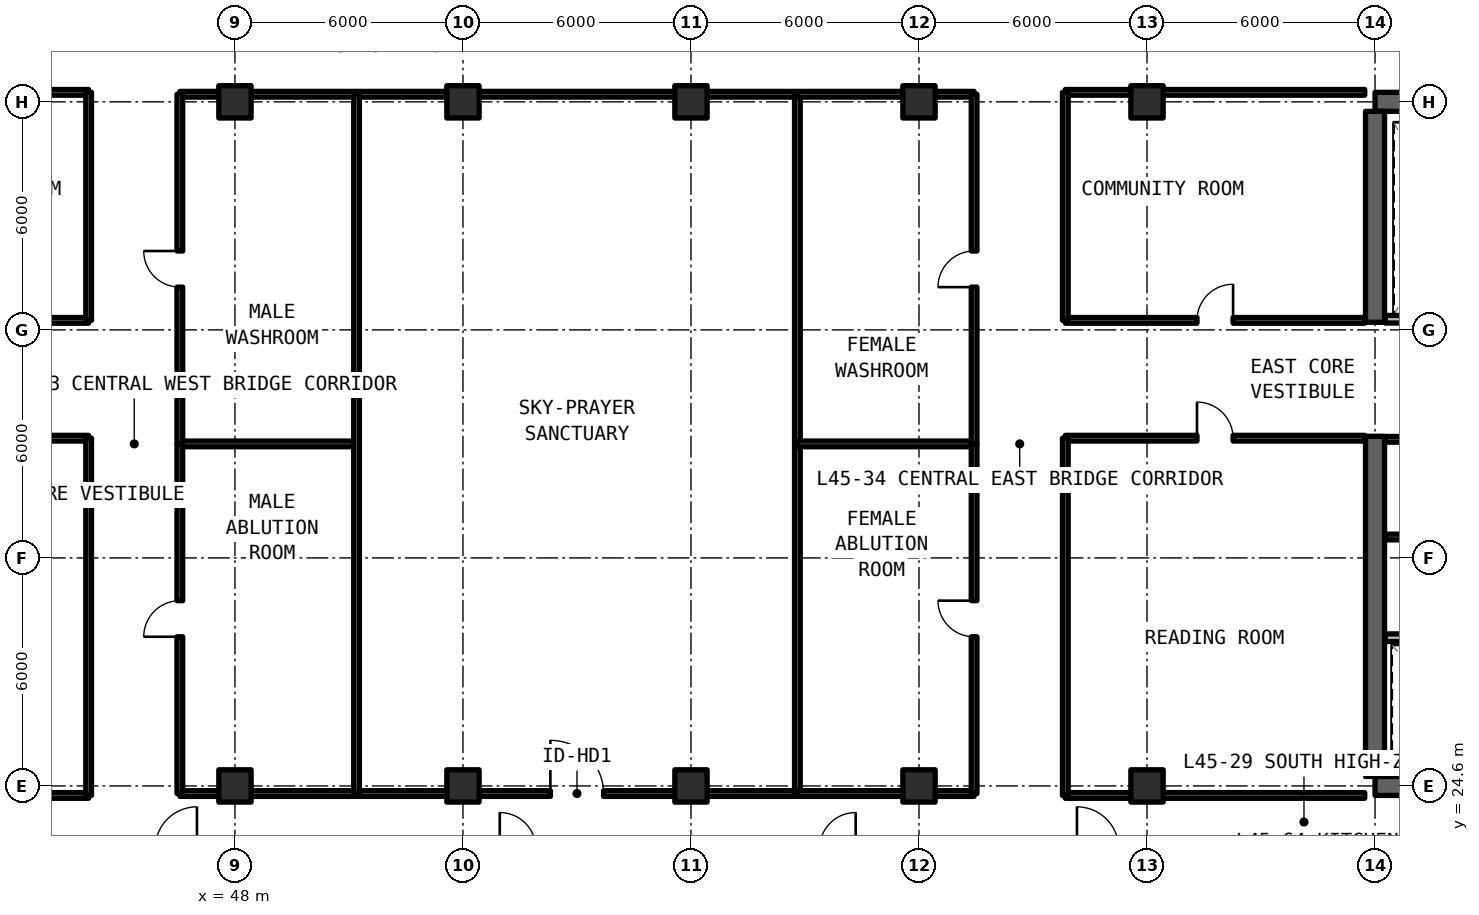
"""IFC4 building model, lengths in metres.
Left out: names, types, materials, properties, quantities, classifications, styles, units other than length and angle.
Written with IfcOpenShell. Run it as: python <this file> out.ifc"""

import sys

from ifc_helpers import new_model, si_unit, direction, frame, frame_2d, origin, origin_2d, place, context, subcontext, project, spatial, rectangle, extrude, element, fill, save


model = new_model("IFC4")
c1 = context("Model", 3, precision=1e-05, world=origin(), true_north=direction((0.0, 1.0)))
c2 = subcontext(c1, "Body", "Model", "MODEL_VIEW")
j1 = project(units=[si_unit("LENGTHUNIT", "METRE"), si_unit("PLANEANGLEUNIT", "RADIAN")], contexts=[c1])
p1 = place(None, origin())
s1 = spatial("IfcSite", under=j1, at=p1, CompositionType="ELEMENT")
p2 = place(p1, origin())
s2 = spatial("IfcBuilding", under=s1, at=p2, CompositionType="ELEMENT")
p3 = place(p2, frame((0.0, 0.0, 162.03)))
s3 = spatial("IfcBuildingStorey", under=s2, at=p3, CompositionType="ELEMENT", Elevation=162.03)
for number, where, z_axis, x_axis in (
    (1, (78.0, 24.6, 0.0), (0.0, 0.0, 1.0), (1.0, 0.0, 0.0)),
    (2, (90.0, 42.6, 0.0), (0.0, 0.0, 1.0), (-1.0, 0.0, 0.0)),
):
    element("IfcWall", number, at=place(p3, frame(where, z_axis=z_axis, x_axis=x_axis)), inside=s3, PredefinedType="SHEAR", context=c2, shape_type="SweptSolid", body=[
        extrude(rectangle(XDim=12.0, YDim=0.5, at=frame_2d((6.0, 0.0))), origin(), (0.0, 0.0, 1.0), 3.63),
    ])
p4 = place(p3, frame((78.0, 24.85, 0.0), z_axis=(0.0, 0.0, 1.0), x_axis=(0.0, 1.0, 0.0)))
e3 = element("IfcWall", 3, at=p4, inside=s3, PredefinedType="SHEAR", context=c2, shape_type="SweptSolid", body=[
    extrude(rectangle(XDim=8.95, YDim=0.5, at=frame_2d((4.475, 0.0))), origin(), (0.0, 0.0, 1.0), 3.63),
])
p5 = place(p3, frame((78.0, 36.8, 0.0), z_axis=(0.0, 0.0, 1.0), x_axis=(0.0, 1.0, 0.0)))
e4 = element("IfcWall", 4, at=p5, inside=s3, PredefinedType="SHEAR", context=c2, shape_type="SweptSolid", body=[
    extrude(rectangle(XDim=5.55, YDim=0.5, at=frame_2d((2.775, 0.0))), origin(), (0.0, 0.0, 1.0), 3.63),
])
for number, where, z_axis, x_axis in (
    (5, (48.0, 24.6, 0.0), (0.0, 0.0, 1.0), (1.0, 0.0, 0.0)),
    (6, (48.0, 42.6, 0.0), (0.0, 0.0, 1.0), (1.0, 0.0, 0.0)),
    (7, (54.0, 24.6, 0.0), (0.0, 0.0, 1.0), (1.0, 0.0, 0.0)),
    (8, (54.0, 42.6, 0.0), (0.0, 0.0, 1.0), (1.0, 0.0, 0.0)),
    (9, (60.0, 24.6, 0.0), (0.0, 0.0, 1.0), (1.0, 0.0, 0.0)),
    (10, (60.0, 42.6, 0.0), (0.0, 0.0, 1.0), (1.0, 0.0, 0.0)),
    (11, (66.0, 24.6, 0.0), (0.0, 0.0, 1.0), (1.0, 0.0, 0.0)),
    (12, (66.0, 42.6, 0.0), (0.0, 0.0, 1.0), (1.0, 0.0, 0.0)),
    (13, (72.0, 24.6, 0.0), (0.0, 0.0, 1.0), (1.0, 0.0, 0.0)),
    (14, (72.0, 42.6, 0.0), (0.0, 0.0, 1.0), (1.0, 0.0, 0.0)),
):
    element("IfcColumn", number, at=place(p3, frame(where, z_axis=z_axis, x_axis=x_axis)), inside=s3, PredefinedType="COLUMN", context=c2, shape_type="SweptSolid", body=[
        extrude(rectangle(XDim=0.85, YDim=0.85, at=origin_2d()), origin(), (0.0, 0.0, 1.0), 3.63),
    ])
p6 = place(p3, frame((78.27, 28.5, 0.0), z_axis=(0.0, 0.0, 1.0), x_axis=(1.0, 0.0, 0.0)))
e15 = element("IfcWall", 15, at=p6, inside=s3, PredefinedType="SOLIDWALL", context=c2, shape_type="SweptSolid", body=[
    extrude(rectangle(XDim=7.51, YDim=0.2, at=frame_2d((3.755, 0.0))), origin(), (0.0, 0.0, 1.0), 2.63),
])
p7 = place(p6, frame((3.53, 0.0, 0.0)))
e16 = element("IfcOpeningElement", 16, at=p7, cuts=e15, PredefinedType="OPENING", context=c2, shape_type="SweptSolid", body=[
    extrude(rectangle(XDim=1.0, YDim=2.15, at=frame_2d((0.5, 1.075))), frame((0.0, 0.11, 0.0), z_axis=(0.0, -1.0, 0.0), x_axis=(1.0, 0.0, 0.0)), (0.0, 0.0, 1.0), 0.22),
])
for number, where, z_axis, x_axis in (
    (17, (78.27, 31.15, 0.0), (0.0, 0.0, 1.0), (1.0, 0.0, 0.0)),
    (18, (78.27, 33.72, 0.0), (0.0, 0.0, 1.0), (1.0, 0.0, 0.0)),
):
    element("IfcWall", number, at=place(p3, frame(where, z_axis=z_axis, x_axis=x_axis)), inside=s3, PredefinedType="SOLIDWALL", context=c2, shape_type="SweptSolid", body=[
        extrude(rectangle(XDim=3.05, YDim=0.15, at=frame_2d((1.525, 0.0))), origin(), (0.0, 0.0, 1.0), 2.63),
    ])
p8 = place(p3, frame((78.27, 36.88, 0.0), z_axis=(0.0, 0.0, 1.0), x_axis=(1.0, 0.0, 0.0)))
e19 = element("IfcWall", 19, at=p8, inside=s3, PredefinedType="SOLIDWALL", context=c2, shape_type="SweptSolid", body=[
    extrude(rectangle(XDim=3.05, YDim=0.2, at=frame_2d((1.525, 0.0))), origin(), (0.0, 0.0, 1.0), 2.63),
])
p9 = place(p3, frame((36.27, 24.35, 0.0), z_axis=(0.0, 0.0, 1.0), x_axis=(1.0, 0.0, 0.0)))
e20 = element("IfcWall", 20, at=p9, inside=s3, PredefinedType="SOLIDWALL", context=c2, shape_type="SweptSolid", body=[
    extrude(rectangle(XDim=7.88, YDim=0.15, at=frame_2d((3.94, 0.0))), origin(), (0.0, 0.0, 1.0), 2.63),
])
p10 = place(p3, frame((36.27, 33.75, 0.0), z_axis=(0.0, 0.0, 1.0), x_axis=(1.0, 0.0, 0.0)))
e21 = element("IfcWall", 21, at=p10, inside=s3, PredefinedType="SOLIDWALL", context=c2, shape_type="SweptSolid", body=[
    extrude(rectangle(XDim=7.88, YDim=0.15, at=frame_2d((3.94, 0.0))), origin(), (0.0, 0.0, 1.0), 2.63),
])
p11 = place(p10, frame((3.465, 0.0, 0.0)))
e22 = element("IfcOpeningElement", 22, at=p11, cuts=e21, PredefinedType="OPENING", context=c2, shape_type="SweptSolid", body=[
    extrude(rectangle(XDim=0.95, YDim=2.15, at=frame_2d((0.475, 1.075))), frame((0.0, 0.085, 0.0), z_axis=(0.0, -1.0, 0.0), x_axis=(1.0, 0.0, 0.0)), (0.0, 0.0, 1.0), 0.17),
])
p12 = place(p3, frame((44.15, 24.35, 0.0), z_axis=(0.0, 0.0, 1.0), x_axis=(0.0, 1.0, 0.0)))
e23 = element("IfcWall", 23, at=p12, inside=s3, PredefinedType="SOLIDWALL", context=c2, shape_type="SweptSolid", body=[
    extrude(rectangle(XDim=9.4, YDim=0.15, at=frame_2d((4.7, 0.0))), origin(), (0.0, 0.0, 1.0), 2.63),
])
p13 = place(p3, frame((36.27, 36.85, 0.0), z_axis=(0.0, 0.0, 1.0), x_axis=(1.0, 0.0, 0.0)))
e24 = element("IfcWall", 24, at=p13, inside=s3, PredefinedType="SOLIDWALL", context=c2, shape_type="SweptSolid", body=[
    extrude(rectangle(XDim=7.88, YDim=0.15, at=frame_2d((3.94, 0.0))), origin(), (0.0, 0.0, 1.0), 2.63),
])
p14 = place(p13, frame((3.465, 0.0, 0.0)))
e25 = element("IfcOpeningElement", 25, at=p14, cuts=e24, PredefinedType="OPENING", context=c2, shape_type="SweptSolid", body=[
    extrude(rectangle(XDim=0.95, YDim=2.15, at=frame_2d((0.475, 1.075))), frame((0.0, 0.085, 0.0), z_axis=(0.0, -1.0, 0.0), x_axis=(1.0, 0.0, 0.0)), (0.0, 0.0, 1.0), 0.17),
])
p15 = place(p3, frame((36.27, 42.85, 0.0), z_axis=(0.0, 0.0, 1.0), x_axis=(1.0, 0.0, 0.0)))
e26 = element("IfcWall", 26, at=p15, inside=s3, PredefinedType="SOLIDWALL", context=c2, shape_type="SweptSolid", body=[
    extrude(rectangle(XDim=7.88, YDim=0.15, at=frame_2d((3.94, 0.0))), origin(), (0.0, 0.0, 1.0), 2.63),
])
p16 = place(p3, frame((44.15, 36.85, 0.0), z_axis=(0.0, 0.0, 1.0), x_axis=(0.0, 1.0, 0.0)))
e27 = element("IfcWall", 27, at=p16, inside=s3, PredefinedType="SOLIDWALL", context=c2, shape_type="SweptSolid", body=[
    extrude(rectangle(XDim=6.0, YDim=0.15, at=frame_2d((3.0, 0.0))), origin(), (0.0, 0.0, 1.0), 2.63),
])
p17 = place(p3, frame((69.85, 24.35, 0.0), z_axis=(0.0, 0.0, 1.0), x_axis=(1.0, 0.0, 0.0)))
e28 = element("IfcWall", 28, at=p17, inside=s3, PredefinedType="SOLIDWALL", context=c2, shape_type="SweptSolid", body=[
    extrude(rectangle(XDim=7.88, YDim=0.15, at=frame_2d((3.94, 0.0))), origin(), (0.0, 0.0, 1.0), 2.63),
])
p18 = place(p3, frame((69.85, 33.75, 0.0), z_axis=(0.0, 0.0, 1.0), x_axis=(1.0, 0.0, 0.0)))
e29 = element("IfcWall", 29, at=p18, inside=s3, PredefinedType="SOLIDWALL", context=c2, shape_type="SweptSolid", body=[
    extrude(rectangle(XDim=7.88, YDim=0.15, at=frame_2d((3.94, 0.0))), origin(), (0.0, 0.0, 1.0), 2.63),
])
p19 = place(p18, frame((3.465, 0.0, 0.0)))
e30 = element("IfcOpeningElement", 30, at=p19, cuts=e29, PredefinedType="OPENING", context=c2, shape_type="SweptSolid", body=[
    extrude(rectangle(XDim=0.95, YDim=2.15, at=frame_2d((0.475, 1.075))), frame((0.0, 0.085, 0.0), z_axis=(0.0, -1.0, 0.0), x_axis=(1.0, 0.0, 0.0)), (0.0, 0.0, 1.0), 0.17),
])
p20 = place(p3, frame((69.85, 24.35, 0.0), z_axis=(0.0, 0.0, 1.0), x_axis=(0.0, 1.0, 0.0)))
e31 = element("IfcWall", 31, at=p20, inside=s3, PredefinedType="SOLIDWALL", context=c2, shape_type="SweptSolid", body=[
    extrude(rectangle(XDim=9.4, YDim=0.15, at=frame_2d((4.7, 0.0))), origin(), (0.0, 0.0, 1.0), 2.63),
])
p21 = place(p3, frame((69.85, 36.85, 0.0), z_axis=(0.0, 0.0, 1.0), x_axis=(1.0, 0.0, 0.0)))
e32 = element("IfcWall", 32, at=p21, inside=s3, PredefinedType="SOLIDWALL", context=c2, shape_type="SweptSolid", body=[
    extrude(rectangle(XDim=7.88, YDim=0.15, at=frame_2d((3.94, 0.0))), origin(), (0.0, 0.0, 1.0), 2.63),
])
p22 = place(p21, frame((3.465, 0.0, 0.0)))
e33 = element("IfcOpeningElement", 33, at=p22, cuts=e32, PredefinedType="OPENING", context=c2, shape_type="SweptSolid", body=[
    extrude(rectangle(XDim=0.95, YDim=2.15, at=frame_2d((0.475, 1.075))), frame((0.0, 0.085, 0.0), z_axis=(0.0, -1.0, 0.0), x_axis=(1.0, 0.0, 0.0)), (0.0, 0.0, 1.0), 0.17),
])
p23 = place(p3, frame((69.85, 42.85, 0.0), z_axis=(0.0, 0.0, 1.0), x_axis=(1.0, 0.0, 0.0)))
e34 = element("IfcWall", 34, at=p23, inside=s3, PredefinedType="SOLIDWALL", context=c2, shape_type="SweptSolid", body=[
    extrude(rectangle(XDim=7.88, YDim=0.15, at=frame_2d((3.94, 0.0))), origin(), (0.0, 0.0, 1.0), 2.63),
])
p24 = place(p3, frame((69.85, 36.85, 0.0), z_axis=(0.0, 0.0, 1.0), x_axis=(0.0, 1.0, 0.0)))
e35 = element("IfcWall", 35, at=p24, inside=s3, PredefinedType="SOLIDWALL", context=c2, shape_type="SweptSolid", body=[
    extrude(rectangle(XDim=6.0, YDim=0.15, at=frame_2d((3.0, 0.0))), origin(), (0.0, 0.0, 1.0), 2.63),
])
for number, where, z_axis, x_axis in (
    (36, (46.55, 24.4, 0.0), (0.0, 0.0, 1.0), (1.0, 0.0, 0.0)),
    (37, (46.55, 33.6, 0.0), (0.0, 0.0, 1.0), (1.0, 0.0, 0.0)),
):
    element("IfcWall", number, at=place(p3, frame(where, z_axis=z_axis, x_axis=x_axis)), inside=s3, PredefinedType="SOLIDWALL", context=c2, shape_type="SweptSolid", body=[
        extrude(rectangle(XDim=4.65, YDim=0.15, at=frame_2d((2.325, 0.0))), origin(), (0.0, 0.0, 1.0), 2.63),
    ])
p25 = place(p3, frame((46.55, 24.4, 0.0), z_axis=(0.0, 0.0, 1.0), x_axis=(0.0, 1.0, 0.0)))
e38 = element("IfcWall", 38, at=p25, inside=s3, PredefinedType="SOLIDWALL", context=c2, shape_type="SweptSolid", body=[
    extrude(rectangle(XDim=9.2, YDim=0.15, at=frame_2d((4.6, 0.0))), origin(), (0.0, 0.0, 1.0), 2.63),
])
p26 = place(p25, frame((4.125, 0.0, 0.0)))
e39 = element("IfcOpeningElement", 39, at=p26, cuts=e38, PredefinedType="OPENING", context=c2, shape_type="SweptSolid", body=[
    extrude(rectangle(XDim=0.95, YDim=2.15, at=frame_2d((0.475, 1.075))), frame((0.0, 0.085, 0.0), z_axis=(0.0, -1.0, 0.0), x_axis=(1.0, 0.0, 0.0)), (0.0, 0.0, 1.0), 0.17),
])
p27 = place(p3, frame((46.55, 42.8, 0.0), z_axis=(0.0, 0.0, 1.0), x_axis=(1.0, 0.0, 0.0)))
e40 = element("IfcWall", 40, at=p27, inside=s3, PredefinedType="SOLIDWALL", context=c2, shape_type="SweptSolid", body=[
    extrude(rectangle(XDim=4.65, YDim=0.15, at=frame_2d((2.325, 0.0))), origin(), (0.0, 0.0, 1.0), 2.63),
])
p28 = place(p3, frame((46.55, 33.6, 0.0), z_axis=(0.0, 0.0, 1.0), x_axis=(0.0, 1.0, 0.0)))
e41 = element("IfcWall", 41, at=p28, inside=s3, PredefinedType="SOLIDWALL", context=c2, shape_type="SweptSolid", body=[
    extrude(rectangle(XDim=9.2, YDim=0.15, at=frame_2d((4.6, 0.0))), origin(), (0.0, 0.0, 1.0), 2.63),
])
p29 = place(p28, frame((4.125, 0.0, 0.0)))
e42 = element("IfcOpeningElement", 42, at=p29, cuts=e41, PredefinedType="OPENING", context=c2, shape_type="SweptSolid", body=[
    extrude(rectangle(XDim=0.95, YDim=2.15, at=frame_2d((0.475, 1.075))), frame((0.0, 0.085, 0.0), z_axis=(0.0, -1.0, 0.0), x_axis=(1.0, 0.0, 0.0)), (0.0, 0.0, 1.0), 0.17),
])
p30 = place(p3, frame((51.2, 24.4, 0.0), z_axis=(0.0, 0.0, 1.0), x_axis=(1.0, 0.0, 0.0)))
e43 = element("IfcWall", 43, at=p30, inside=s3, PredefinedType="SOLIDWALL", context=c2, shape_type="SweptSolid", body=[
    extrude(rectangle(XDim=11.6, YDim=0.15, at=frame_2d((5.8, 0.0))), origin(), (0.0, 0.0, 1.0), 2.63),
])
p31 = place(p30, frame((5.1, 0.0, 0.0)))
e44 = element("IfcOpeningElement", 44, at=p31, cuts=e43, PredefinedType="OPENING", context=c2, shape_type="SweptSolid", body=[
    extrude(rectangle(XDim=1.4, YDim=2.15, at=frame_2d((0.7, 1.075))), frame((0.0, 0.085, 0.0), z_axis=(0.0, -1.0, 0.0), x_axis=(1.0, 0.0, 0.0)), (0.0, 0.0, 1.0), 0.17),
])
p32 = place(p3, frame((51.2, 42.8, 0.0), z_axis=(0.0, 0.0, 1.0), x_axis=(1.0, 0.0, 0.0)))
e45 = element("IfcWall", 45, at=p32, inside=s3, PredefinedType="SOLIDWALL", context=c2, shape_type="SweptSolid", body=[
    extrude(rectangle(XDim=11.6, YDim=0.15, at=frame_2d((5.8, 0.0))), origin(), (0.0, 0.0, 1.0), 2.63),
])
for number, where, z_axis, x_axis in (
    (46, (51.2, 24.4, 0.0), (0.0, 0.0, 1.0), (0.0, 1.0, 0.0)),
    (47, (62.8, 24.4, 0.0), (0.0, 0.0, 1.0), (0.0, 1.0, 0.0)),
):
    element("IfcWall", number, at=place(p3, frame(where, z_axis=z_axis, x_axis=x_axis)), inside=s3, PredefinedType="SOLIDWALL", context=c2, shape_type="SweptSolid", body=[
        extrude(rectangle(XDim=18.4, YDim=0.15, at=frame_2d((9.2, 0.0))), origin(), (0.0, 0.0, 1.0), 2.63),
    ])
for number, where, z_axis, x_axis in (
    (48, (62.8, 24.4, 0.0), (0.0, 0.0, 1.0), (1.0, 0.0, 0.0)),
    (49, (62.8, 33.6, 0.0), (0.0, 0.0, 1.0), (1.0, 0.0, 0.0)),
):
    element("IfcWall", number, at=place(p3, frame(where, z_axis=z_axis, x_axis=x_axis)), inside=s3, PredefinedType="SOLIDWALL", context=c2, shape_type="SweptSolid", body=[
        extrude(rectangle(XDim=4.65, YDim=0.15, at=frame_2d((2.325, 0.0))), origin(), (0.0, 0.0, 1.0), 2.63),
    ])
p33 = place(p3, frame((67.45, 24.4, 0.0), z_axis=(0.0, 0.0, 1.0), x_axis=(0.0, 1.0, 0.0)))
e50 = element("IfcWall", 50, at=p33, inside=s3, PredefinedType="SOLIDWALL", context=c2, shape_type="SweptSolid", body=[
    extrude(rectangle(XDim=9.2, YDim=0.15, at=frame_2d((4.6, 0.0))), origin(), (0.0, 0.0, 1.0), 2.63),
])
p34 = place(p33, frame((4.125, 0.0, 0.0)))
e51 = element("IfcOpeningElement", 51, at=p34, cuts=e50, PredefinedType="OPENING", context=c2, shape_type="SweptSolid", body=[
    extrude(rectangle(XDim=0.95, YDim=2.15, at=frame_2d((0.475, 1.075))), frame((0.0, 0.085, 0.0), z_axis=(0.0, -1.0, 0.0), x_axis=(1.0, 0.0, 0.0)), (0.0, 0.0, 1.0), 0.17),
])
p35 = place(p3, frame((62.8, 42.8, 0.0), z_axis=(0.0, 0.0, 1.0), x_axis=(1.0, 0.0, 0.0)))
e52 = element("IfcWall", 52, at=p35, inside=s3, PredefinedType="SOLIDWALL", context=c2, shape_type="SweptSolid", body=[
    extrude(rectangle(XDim=4.65, YDim=0.15, at=frame_2d((2.325, 0.0))), origin(), (0.0, 0.0, 1.0), 2.63),
])
p36 = place(p3, frame((67.45, 33.6, 0.0), z_axis=(0.0, 0.0, 1.0), x_axis=(0.0, 1.0, 0.0)))
e53 = element("IfcWall", 53, at=p36, inside=s3, PredefinedType="SOLIDWALL", context=c2, shape_type="SweptSolid", body=[
    extrude(rectangle(XDim=9.2, YDim=0.15, at=frame_2d((4.6, 0.0))), origin(), (0.0, 0.0, 1.0), 2.63),
])
p37 = place(p36, frame((4.125, 0.0, 0.0)))
e54 = element("IfcOpeningElement", 54, at=p37, cuts=e53, PredefinedType="OPENING", context=c2, shape_type="SweptSolid", body=[
    extrude(rectangle(XDim=0.95, YDim=2.15, at=frame_2d((0.475, 1.075))), frame((0.0, 0.085, 0.0), z_axis=(0.0, -1.0, 0.0), x_axis=(1.0, 0.0, 0.0)), (0.0, 0.0, 1.0), 0.17),
])
p38 = place(p19, origin())
e55 = element("IfcDoor", 55, at=p38, inside=s3, OperationType="SINGLE_SWING_LEFT", PredefinedType="DOOR", context=c2, shape_type="SweptSolid", body=[
    extrude(rectangle(XDim=0.95, YDim=2.15, at=frame_2d((0.475, 1.075))), frame((0.0, 0.025, 0.0), z_axis=(0.0, -1.0, 0.0), x_axis=(1.0, 0.0, 0.0)), (0.0, 0.0, 1.0), 0.05),
])
fill(e30, e55)
p39 = place(p22, origin())
e56 = element("IfcDoor", 56, at=p39, inside=s3, OperationType="SINGLE_SWING_RIGHT", PredefinedType="DOOR", context=c2, shape_type="SweptSolid", body=[
    extrude(rectangle(XDim=0.95, YDim=2.15, at=frame_2d((0.475, 1.075))), frame((0.0, 0.025, 0.0), z_axis=(0.0, -1.0, 0.0), x_axis=(1.0, 0.0, 0.0)), (0.0, 0.0, 1.0), 0.05),
])
fill(e33, e56)
p40 = place(p26, origin())
e57 = element("IfcDoor", 57, at=p40, inside=s3, OperationType="SINGLE_SWING_LEFT", PredefinedType="DOOR", context=c2, shape_type="SweptSolid", body=[
    extrude(rectangle(XDim=0.95, YDim=2.15, at=frame_2d((0.475, 1.075))), frame((0.0, 0.025, 0.0), z_axis=(0.0, -1.0, 0.0), x_axis=(1.0, 0.0, 0.0)), (0.0, 0.0, 1.0), 0.05),
])
fill(e39, e57)
p41 = place(p29, origin())
e58 = element("IfcDoor", 58, at=p41, inside=s3, OperationType="SINGLE_SWING_RIGHT", PredefinedType="DOOR", context=c2, shape_type="SweptSolid", body=[
    extrude(rectangle(XDim=0.95, YDim=2.15, at=frame_2d((0.475, 1.075))), frame((0.0, 0.025, 0.0), z_axis=(0.0, -1.0, 0.0), x_axis=(1.0, 0.0, 0.0)), (0.0, 0.0, 1.0), 0.05),
])
fill(e42, e58)
p42 = place(p31, origin())
e59 = element("IfcDoor", 59, at=p42, inside=s3, OperationType="SINGLE_SWING_LEFT", PredefinedType="DOOR", context=c2, shape_type="SweptSolid", body=[
    extrude(rectangle(XDim=1.4, YDim=2.15, at=frame_2d((0.7, 1.075))), frame((0.0, 0.025, 0.0), z_axis=(0.0, -1.0, 0.0), x_axis=(1.0, 0.0, 0.0)), (0.0, 0.0, 1.0), 0.05),
])
fill(e44, e59)
p43 = place(p34, origin())
e60 = element("IfcDoor", 60, at=p43, inside=s3, OperationType="SINGLE_SWING_RIGHT", PredefinedType="DOOR", context=c2, shape_type="SweptSolid", body=[
    extrude(rectangle(XDim=0.95, YDim=2.15, at=frame_2d((0.475, 1.075))), frame((0.0, 0.025, 0.0), z_axis=(0.0, -1.0, 0.0), x_axis=(1.0, 0.0, 0.0)), (0.0, 0.0, 1.0), 0.05),
])
fill(e51, e60)
p44 = place(p37, origin())
e61 = element("IfcDoor", 61, at=p44, inside=s3, OperationType="SINGLE_SWING_LEFT", PredefinedType="DOOR", context=c2, shape_type="SweptSolid", body=[
    extrude(rectangle(XDim=0.95, YDim=2.15, at=frame_2d((0.475, 1.075))), frame((0.0, 0.025, 0.0), z_axis=(0.0, -1.0, 0.0), x_axis=(1.0, 0.0, 0.0)), (0.0, 0.0, 1.0), 0.05),
])
fill(e54, e61)
save(model, sys.argv[1])
